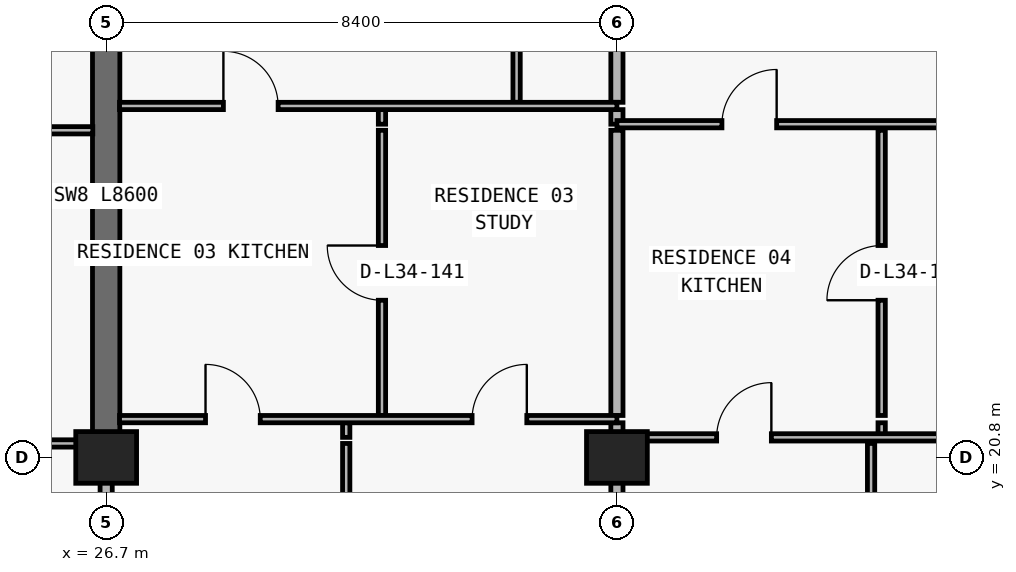
"""IFC4 building model, lengths in metres.
Left out: names, types, materials, properties, quantities, classifications, styles, units other than length and angle.
Written with IfcOpenShell. Run it as: python <this file> out.ifc"""

import sys

from ifc_helpers import new_model, si_unit, direction, frame, frame_2d, origin, origin_2d, place, context, subcontext, project, spatial, rectangle, extrude, element, fill, save


model = new_model("IFC4")
c1 = context("Model", 3, precision=1e-05, world=origin(), true_north=direction((0.0, 1.0)))
c2 = subcontext(c1, "Body", "Model", "MODEL_VIEW")
j1 = project(units=[si_unit("LENGTHUNIT", "METRE"), si_unit("PLANEANGLEUNIT", "RADIAN")], contexts=[c1])
p1 = place(None, origin())
s1 = spatial("IfcSite", under=j1, at=p1, CompositionType="ELEMENT")
p2 = place(p1, origin())
s2 = spatial("IfcBuilding", under=s1, at=p2, CompositionType="ELEMENT")
p3 = place(p2, frame((0.0, 0.0, 125.7)))
s3 = spatial("IfcBuildingStorey", under=s2, at=p3, CompositionType="ELEMENT", Elevation=125.7)
for number, where, z_axis, x_axis in (
    (1, (26.7, 20.8, 0.0), (0.0, 0.0, 1.0), (1.0, 0.0, 0.0)),
    (2, (35.1, 20.8, 0.0), (0.0, 0.0, 1.0), (1.0, 0.0, 0.0)),
):
    element("IfcColumn", number, at=place(p3, frame(where, z_axis=z_axis, x_axis=x_axis)), inside=s3, PredefinedType="COLUMN", context=c2, shape_type="SweptSolid", body=[
        extrude(rectangle(XDim=1.0, YDim=0.85, at=origin_2d()), origin(), (0.0, 0.0, 1.0), 3.05),
    ])
p4 = place(p3, frame((26.7, 20.8, 0.0), z_axis=(0.0, 0.0, 1.0), x_axis=(0.0, 1.0, 0.0)))
e3 = element("IfcWall", 3, at=p4, inside=s3, PredefinedType="SHEAR", context=c2, shape_type="SweptSolid", body=[
    extrude(rectangle(XDim=8.6, YDim=0.45, at=frame_2d((4.3, 0.0))), origin(), (0.0, 0.0, 1.0), 3.05),
])
p5 = place(p3, frame((26.7, 8.84, 0.0), z_axis=(0.0, 0.0, 1.0), x_axis=(0.0, 1.0, 0.0)))
e4 = element("IfcWall", 4, at=p5, inside=s3, PredefinedType="PARTITIONING", context=c2, shape_type="SweptSolid", body=[
    extrude(rectangle(XDim=11.955, YDim=0.2, at=frame_2d((5.978, 0.0))), origin(), (0.0, 0.0, 1.0), 2.174),
])
p6 = place(p3, frame((30.648, 8.84, 0.0), z_axis=(0.0, 0.0, 1.0), x_axis=(0.0, 1.0, 0.0)))
e5 = element("IfcWall", 5, at=p6, inside=s3, PredefinedType="PARTITIONING", context=c2, shape_type="SweptSolid", body=[
    extrude(rectangle(XDim=12.19, YDim=0.12, at=frame_2d((6.095, 0.0))), origin(), (0.0, 0.0, 1.0), 3.05),
])
p7 = place(p3, frame((30.648, 21.13, 0.0), z_axis=(0.0, 0.0, 1.0), x_axis=(0.0, 1.0, 0.0)))
e6 = element("IfcWall", 6, at=p7, inside=s3, PredefinedType="PARTITIONING", context=c2, shape_type="SweptSolid", body=[
    extrude(rectangle(XDim=0.24, YDim=0.12, at=frame_2d((0.12, 0.0))), origin(), (0.0, 0.0, 1.0), 3.05),
])
p8 = place(p3, frame((31.236, 21.49, 0.0), z_axis=(0.0, 0.0, 1.0), x_axis=(0.0, 1.0, 0.0)))
e7 = element("IfcWall", 7, at=p8, inside=s3, PredefinedType="PARTITIONING", context=c2, shape_type="SweptSolid", body=[
    extrude(rectangle(XDim=4.69, YDim=0.12, at=frame_2d((2.345, 0.0))), origin(), (0.0, 0.0, 1.0), 3.05),
])
p9 = place(p8, frame((1.895, 0.0, 0.0)))
e8 = element("IfcOpeningElement", 8, at=p9, cuts=e7, PredefinedType="OPENING", context=c2, shape_type="SweptSolid", body=[
    extrude(rectangle(XDim=0.9, YDim=2.15, at=frame_2d((0.45, 1.075))), frame((0.0, 0.07, 0.0), z_axis=(0.0, -1.0, 0.0), x_axis=(1.0, 0.0, 0.0)), (0.0, 0.0, 1.0), 0.14),
])
p10 = place(p3, frame((31.236, 26.28, 0.0), z_axis=(0.0, 0.0, 1.0), x_axis=(0.0, 1.0, 0.0)))
e9 = element("IfcWall", 9, at=p10, inside=s3, PredefinedType="PARTITIONING", context=c2, shape_type="SweptSolid", body=[
    extrude(rectangle(XDim=0.24, YDim=0.12, at=frame_2d((0.12, 0.0))), origin(), (0.0, 0.0, 1.0), 3.05),
])
p11 = place(p3, frame((33.45, 26.64, 0.0), z_axis=(0.0, 0.0, 1.0), x_axis=(0.0, 1.0, 0.0)))
e10 = element("IfcWall", 10, at=p11, inside=s3, PredefinedType="PARTITIONING", context=c2, shape_type="SweptSolid", body=[
    extrude(rectangle(XDim=8.06, YDim=0.12, at=frame_2d((4.03, 0.0))), origin(), (0.0, 0.0, 1.0), 3.05),
])
p12 = place(p11, frame((3.755, 0.0, 0.0)))
e11 = element("IfcOpeningElement", 11, at=p12, cuts=e10, PredefinedType="OPENING", context=c2, shape_type="SweptSolid", body=[
    extrude(rectangle(XDim=0.85, YDim=2.1, at=frame_2d((0.425, 1.05))), frame((0.0, 0.07, 0.0), z_axis=(0.0, -1.0, 0.0), x_axis=(1.0, 0.0, 0.0)), (0.0, 0.0, 1.0), 0.14),
])
p13 = place(p3, frame((35.1, 8.84, 0.0), z_axis=(0.0, 0.0, 1.0), x_axis=(0.0, 1.0, 0.0)))
e12 = element("IfcWall", 12, at=p13, inside=s3, PredefinedType="PARTITIONING", context=c2, shape_type="SweptSolid", body=[
    extrude(rectangle(XDim=12.19, YDim=0.2, at=frame_2d((6.095, 0.0))), origin(), (0.0, 0.0, 1.0), 2.174),
])
p14 = place(p3, frame((35.1, 21.13, 0.0), z_axis=(0.0, 0.0, 1.0), x_axis=(0.0, 1.0, 0.0)))
e13 = element("IfcWall", 13, at=p14, inside=s3, PredefinedType="PARTITIONING", context=c2, shape_type="SweptSolid", body=[
    extrude(rectangle(XDim=0.24, YDim=0.2, at=frame_2d((0.12, 0.0))), origin(), (0.0, 0.0, 1.0), 2.174),
])
p15 = place(p3, frame((35.1, 21.49, 0.0), z_axis=(0.0, 0.0, 1.0), x_axis=(0.0, 1.0, 0.0)))
e14 = element("IfcWall", 14, at=p15, inside=s3, PredefinedType="PARTITIONING", context=c2, shape_type="SweptSolid", body=[
    extrude(rectangle(XDim=4.69, YDim=0.2, at=frame_2d((2.345, 0.0))), origin(), (0.0, 0.0, 1.0), 2.174),
])
p16 = place(p3, frame((35.1, 26.28, 0.0), z_axis=(0.0, 0.0, 1.0), x_axis=(0.0, 1.0, 0.0)))
e15 = element("IfcWall", 15, at=p16, inside=s3, PredefinedType="PARTITIONING", context=c2, shape_type="SweptSolid", body=[
    extrude(rectangle(XDim=0.24, YDim=0.2, at=frame_2d((0.12, 0.0))), origin(), (0.0, 0.0, 1.0), 2.174),
])
p17 = place(p3, frame((35.1, 26.64, 0.0), z_axis=(0.0, 0.0, 1.0), x_axis=(0.0, 1.0, 0.0)))
e16 = element("IfcWall", 16, at=p17, inside=s3, PredefinedType="PARTITIONING", context=c2, shape_type="SweptSolid", body=[
    extrude(rectangle(XDim=8.06, YDim=0.2, at=frame_2d((4.03, 0.0))), origin(), (0.0, 0.0, 1.0), 2.174),
])
p18 = place(p3, frame((39.28, 8.84, 0.0), z_axis=(0.0, 0.0, 1.0), x_axis=(0.0, 1.0, 0.0)))
e17 = element("IfcWall", 17, at=p18, inside=s3, PredefinedType="PARTITIONING", context=c2, shape_type="SweptSolid", body=[
    extrude(rectangle(XDim=12.19, YDim=0.12, at=frame_2d((6.095, 0.0))), origin(), (0.0, 0.0, 1.0), 3.05),
])
p19 = place(p3, frame((39.454, 21.13, 0.0), z_axis=(0.0, 0.0, 1.0), x_axis=(0.0, 1.0, 0.0)))
e18 = element("IfcWall", 18, at=p19, inside=s3, PredefinedType="PARTITIONING", context=c2, shape_type="SweptSolid", body=[
    extrude(rectangle(XDim=0.24, YDim=0.12, at=frame_2d((0.12, 0.0))), origin(), (0.0, 0.0, 1.0), 3.05),
])
p20 = place(p3, frame((39.454, 21.49, 0.0), z_axis=(0.0, 0.0, 1.0), x_axis=(0.0, 1.0, 0.0)))
e19 = element("IfcWall", 19, at=p20, inside=s3, PredefinedType="PARTITIONING", context=c2, shape_type="SweptSolid", body=[
    extrude(rectangle(XDim=4.69, YDim=0.12, at=frame_2d((2.345, 0.0))), origin(), (0.0, 0.0, 1.0), 3.05),
])
p21 = place(p20, frame((1.895, 0.0, 0.0)))
e20 = element("IfcOpeningElement", 20, at=p21, cuts=e19, PredefinedType="OPENING", context=c2, shape_type="SweptSolid", body=[
    extrude(rectangle(XDim=0.9, YDim=2.15, at=frame_2d((0.45, 1.075))), frame((0.0, 0.07, 0.0), z_axis=(0.0, -1.0, 0.0), x_axis=(1.0, 0.0, 0.0)), (0.0, 0.0, 1.0), 0.14),
])
p22 = place(p3, frame((18.3, 21.03, 0.0), z_axis=(0.0, 0.0, 1.0), x_axis=(1.0, 0.0, 0.0)))
e21 = element("IfcWall", 21, at=p22, inside=s3, PredefinedType="PARTITIONING", context=c2, shape_type="SweptSolid", body=[
    extrude(rectangle(XDim=8.18, YDim=0.12, at=frame_2d((4.09, 0.0))), origin(), (0.0, 0.0, 1.0), 2.174),
])
p23 = place(p22, frame((1.693, 0.0, 0.0)))
e22 = element("IfcOpeningElement", 22, at=p23, cuts=e21, PredefinedType="OPENING", context=c2, shape_type="SweptSolid", body=[
    extrude(rectangle(XDim=0.9, YDim=2.124, at=frame_2d((0.45, 1.062))), frame((0.0, 0.07, 0.0), z_axis=(0.0, -1.0, 0.0), x_axis=(1.0, 0.0, 0.0)), (0.0, 0.0, 1.0), 0.14),
])
p24 = place(p22, frame((5.95, 0.0, 0.0)))
e23 = element("IfcOpeningElement", 23, at=p24, cuts=e21, PredefinedType="OPENING", context=c2, shape_type="SweptSolid", body=[
    extrude(rectangle(XDim=0.9, YDim=2.124, at=frame_2d((0.45, 1.062))), frame((0.0, 0.07, 0.0), z_axis=(0.0, -1.0, 0.0), x_axis=(1.0, 0.0, 0.0)), (0.0, 0.0, 1.0), 0.14),
])
p25 = place(p3, frame((35.1, 21.13, 0.0), z_axis=(0.0, 0.0, 1.0), x_axis=(1.0, 0.0, 0.0)))
e24 = element("IfcWall", 24, at=p25, inside=s3, PredefinedType="PARTITIONING", context=c2, shape_type="SweptSolid", body=[
    extrude(rectangle(XDim=7.6, YDim=0.12, at=frame_2d((3.8, 0.0))), origin(), (0.0, 0.0, 1.0), 2.174),
])
p26 = place(p25, frame((1.64, 0.0, 0.0)))
e25 = element("IfcOpeningElement", 25, at=p26, cuts=e24, PredefinedType="OPENING", context=c2, shape_type="SweptSolid", body=[
    extrude(rectangle(XDim=0.9, YDim=2.124, at=frame_2d((0.45, 1.062))), frame((0.0, 0.07, 0.0), z_axis=(0.0, -1.0, 0.0), x_axis=(1.0, 0.0, 0.0)), (0.0, 0.0, 1.0), 0.14),
])
p27 = place(p25, frame((5.527, 0.0, 0.0)))
e26 = element("IfcOpeningElement", 26, at=p27, cuts=e24, PredefinedType="OPENING", context=c2, shape_type="SweptSolid", body=[
    extrude(rectangle(XDim=0.9, YDim=2.124, at=frame_2d((0.45, 1.062))), frame((0.0, 0.07, 0.0), z_axis=(0.0, -1.0, 0.0), x_axis=(1.0, 0.0, 0.0)), (0.0, 0.0, 1.0), 0.14),
])
p28 = place(p3, frame((26.92, 21.43, 0.0), z_axis=(0.0, 0.0, 1.0), x_axis=(1.0, 0.0, 0.0)))
e27 = element("IfcWall", 27, at=p28, inside=s3, PredefinedType="PARTITIONING", context=c2, shape_type="SweptSolid", body=[
    extrude(rectangle(XDim=8.18, YDim=0.12, at=frame_2d((4.09, 0.0))), origin(), (0.0, 0.0, 1.0), 3.05),
])
p29 = place(p28, frame((1.414, 0.0, 0.0)))
e28 = element("IfcOpeningElement", 28, at=p29, cuts=e27, PredefinedType="OPENING", context=c2, shape_type="SweptSolid", body=[
    extrude(rectangle(XDim=0.9, YDim=2.15, at=frame_2d((0.45, 1.075))), frame((0.0, 0.07, 0.0), z_axis=(0.0, -1.0, 0.0), x_axis=(1.0, 0.0, 0.0)), (0.0, 0.0, 1.0), 0.14),
])
p30 = place(p28, frame((5.798, 0.0, 0.0)))
e29 = element("IfcOpeningElement", 29, at=p30, cuts=e27, PredefinedType="OPENING", context=c2, shape_type="SweptSolid", body=[
    extrude(rectangle(XDim=0.9, YDim=2.15, at=frame_2d((0.45, 1.075))), frame((0.0, 0.07, 0.0), z_axis=(0.0, -1.0, 0.0), x_axis=(1.0, 0.0, 0.0)), (0.0, 0.0, 1.0), 0.14),
])
p31 = place(p3, frame((18.3, 26.18, 0.0), z_axis=(0.0, 0.0, 1.0), x_axis=(1.0, 0.0, 0.0)))
e30 = element("IfcWall", 30, at=p31, inside=s3, PredefinedType="PARTITIONING", context=c2, shape_type="SweptSolid", body=[
    extrude(rectangle(XDim=8.18, YDim=0.12, at=frame_2d((4.09, 0.0))), origin(), (0.0, 0.0, 1.0), 3.05),
])
p32 = place(p31, frame((1.693, 0.0, 0.0)))
e31 = element("IfcOpeningElement", 31, at=p32, cuts=e30, PredefinedType="OPENING", context=c2, shape_type="SweptSolid", body=[
    extrude(rectangle(XDim=0.9, YDim=2.15, at=frame_2d((0.45, 1.075))), frame((0.0, 0.07, 0.0), z_axis=(0.0, -1.0, 0.0), x_axis=(1.0, 0.0, 0.0)), (0.0, 0.0, 1.0), 0.14),
])
p33 = place(p3, frame((35.1, 26.28, 0.0), z_axis=(0.0, 0.0, 1.0), x_axis=(1.0, 0.0, 0.0)))
e32 = element("IfcWall", 32, at=p33, inside=s3, PredefinedType="PARTITIONING", context=c2, shape_type="SweptSolid", body=[
    extrude(rectangle(XDim=7.6, YDim=0.12, at=frame_2d((3.8, 0.0))), origin(), (0.0, 0.0, 1.0), 3.05),
])
p34 = place(p33, frame((1.727, 0.0, 0.0)))
e33 = element("IfcOpeningElement", 33, at=p34, cuts=e32, PredefinedType="OPENING", context=c2, shape_type="SweptSolid", body=[
    extrude(rectangle(XDim=0.9, YDim=2.15, at=frame_2d((0.45, 1.075))), frame((0.0, 0.07, 0.0), z_axis=(0.0, -1.0, 0.0), x_axis=(1.0, 0.0, 0.0)), (0.0, 0.0, 1.0), 0.14),
])
p35 = place(p3, frame((26.92, 26.58, 0.0), z_axis=(0.0, 0.0, 1.0), x_axis=(1.0, 0.0, 0.0)))
e34 = element("IfcWall", 34, at=p35, inside=s3, PredefinedType="PARTITIONING", context=c2, shape_type="SweptSolid", body=[
    extrude(rectangle(XDim=8.18, YDim=0.12, at=frame_2d((4.09, 0.0))), origin(), (0.0, 0.0, 1.0), 3.05),
])
p36 = place(p35, frame((1.708, 0.0, 0.0)))
e35 = element("IfcOpeningElement", 35, at=p36, cuts=e34, PredefinedType="OPENING", context=c2, shape_type="SweptSolid", body=[
    extrude(rectangle(XDim=0.9, YDim=2.15, at=frame_2d((0.45, 1.075))), frame((0.0, 0.07, 0.0), z_axis=(0.0, -1.0, 0.0), x_axis=(1.0, 0.0, 0.0)), (0.0, 0.0, 1.0), 0.14),
])
p37 = place(p36, origin())
e36 = element("IfcDoor", 36, at=p37, inside=s3, OperationType="SINGLE_SWING_LEFT", PredefinedType="DOOR", context=c2, shape_type="SweptSolid", body=[
    extrude(rectangle(XDim=0.9, YDim=2.15, at=frame_2d((0.45, 1.075))), frame((0.0, 0.025, 0.0), z_axis=(0.0, -1.0, 0.0), x_axis=(1.0, 0.0, 0.0)), (0.0, 0.0, 1.0), 0.05),
])
fill(e35, e36)
p38 = place(p9, origin())
e37 = element("IfcDoor", 37, at=p38, inside=s3, OperationType="SINGLE_SWING_RIGHT", PredefinedType="DOOR", context=c2, shape_type="SweptSolid", body=[
    extrude(rectangle(XDim=0.9, YDim=2.15, at=frame_2d((0.45, 1.075))), frame((0.0, 0.025, 0.0), z_axis=(0.0, -1.0, 0.0), x_axis=(1.0, 0.0, 0.0)), (0.0, 0.0, 1.0), 0.05),
])
fill(e8, e37)
p39 = place(p29, origin())
e38 = element("IfcDoor", 38, at=p39, inside=s3, OperationType="SINGLE_SWING_LEFT", PredefinedType="DOOR", context=c2, shape_type="SweptSolid", body=[
    extrude(rectangle(XDim=0.9, YDim=2.15, at=frame_2d((0.45, 1.075))), frame((0.0, 0.025, 0.0), z_axis=(0.0, -1.0, 0.0), x_axis=(1.0, 0.0, 0.0)), (0.0, 0.0, 1.0), 0.05),
])
fill(e28, e38)
p40 = place(p30, origin())
e39 = element("IfcDoor", 39, at=p40, inside=s3, OperationType="SINGLE_SWING_RIGHT", PredefinedType="DOOR", context=c2, shape_type="SweptSolid", body=[
    extrude(rectangle(XDim=0.9, YDim=2.15, at=frame_2d((0.45, 1.075))), frame((0.0, 0.025, 0.0), z_axis=(0.0, -1.0, 0.0), x_axis=(1.0, 0.0, 0.0)), (0.0, 0.0, 1.0), 0.05),
])
fill(e29, e39)
p41 = place(p34, origin())
e40 = element("IfcDoor", 40, at=p41, inside=s3, OperationType="SINGLE_SWING_RIGHT", PredefinedType="DOOR", context=c2, shape_type="SweptSolid", body=[
    extrude(rectangle(XDim=0.9, YDim=2.15, at=frame_2d((0.45, 1.075))), frame((0.0, 0.025, 0.0), z_axis=(0.0, -1.0, 0.0), x_axis=(1.0, 0.0, 0.0)), (0.0, 0.0, 1.0), 0.05),
])
fill(e33, e40)
p42 = place(p21, origin())
e41 = element("IfcDoor", 41, at=p42, inside=s3, OperationType="SINGLE_SWING_LEFT", PredefinedType="DOOR", context=c2, shape_type="SweptSolid", body=[
    extrude(rectangle(XDim=0.9, YDim=2.15, at=frame_2d((0.45, 1.075))), frame((0.0, 0.025, 0.0), z_axis=(0.0, -1.0, 0.0), x_axis=(1.0, 0.0, 0.0)), (0.0, 0.0, 1.0), 0.05),
])
fill(e20, e41)
p43 = place(p26, origin())
e42 = element("IfcDoor", 42, at=p43, inside=s3, OperationType="SINGLE_SWING_RIGHT", PredefinedType="DOOR", context=c2, shape_type="SweptSolid", body=[
    extrude(rectangle(XDim=0.9, YDim=2.124, at=frame_2d((0.45, 1.062))), frame((0.0, 0.025, 0.0), z_axis=(0.0, -1.0, 0.0), x_axis=(1.0, 0.0, 0.0)), (0.0, 0.0, 1.0), 0.05),
])
fill(e25, e42)
save(model, sys.argv[1])
